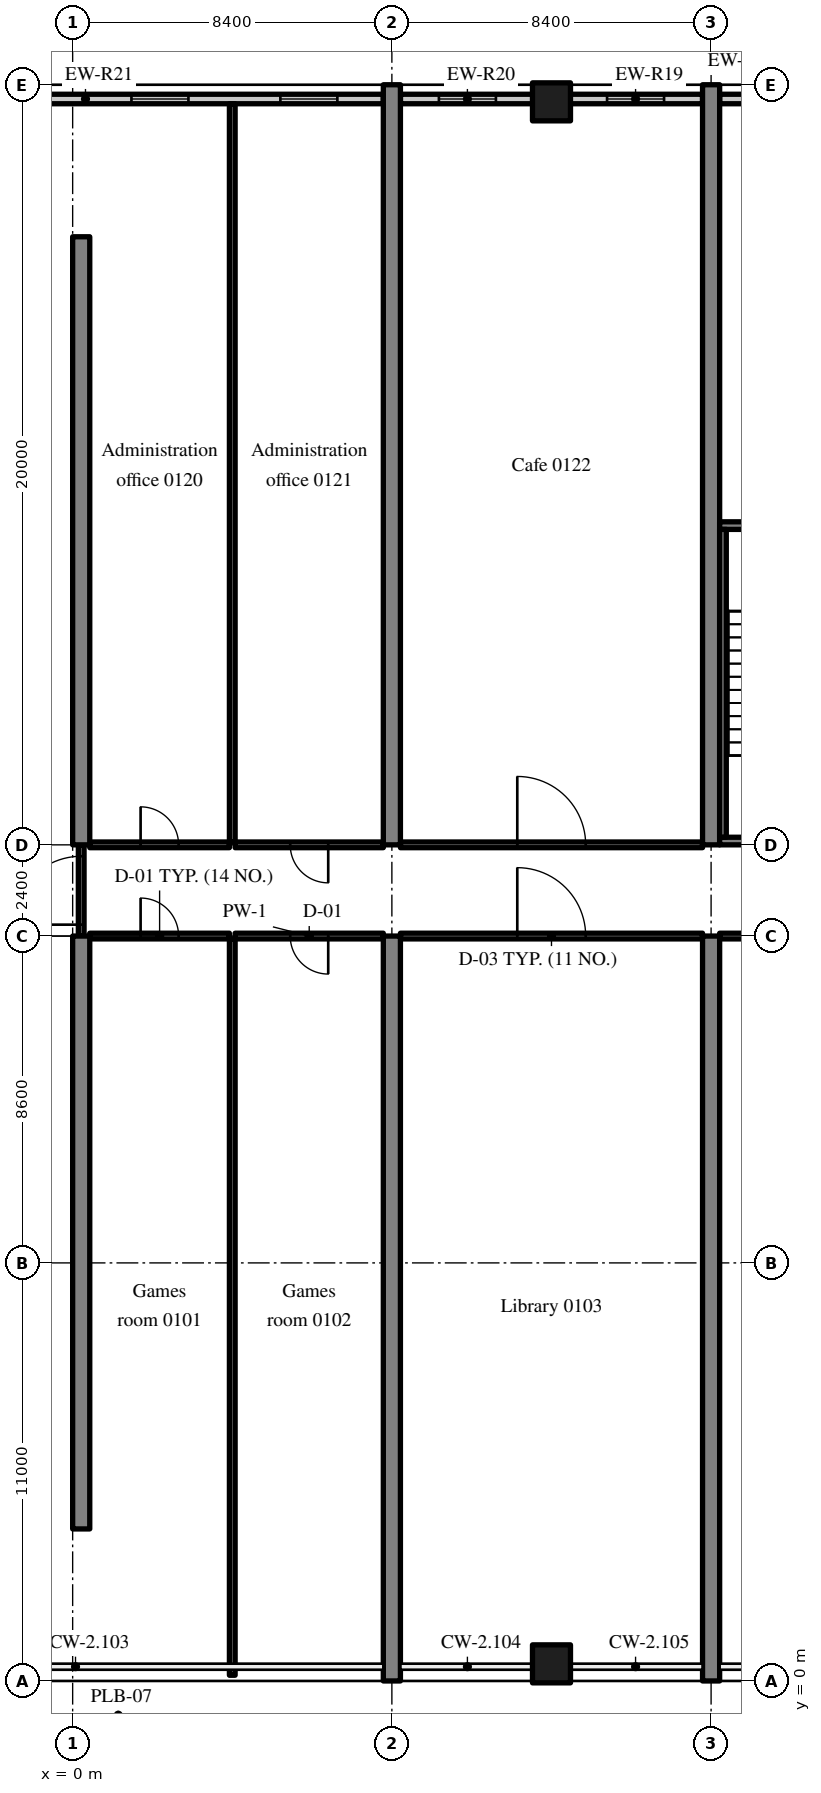
"""IFC4 building model, lengths in metres.
Left out: names, types, materials, properties, quantities, classifications, styles, units other than length and angle.
Written with IfcOpenShell. Run it as: python <this file> out.ifc"""

import sys

from ifc_helpers import new_model, si_unit, direction, frame, frame_2d, origin, origin_2d, place, context, subcontext, project, spatial, rectangle, extrude, source, transform, mapped, element, fill, save


model = new_model("IFC4")
c1 = context("Model", 3, precision=1e-05, world=origin(), true_north=direction((0.0, 1.0)))
c2 = subcontext(c1, "Body", "Model", "MODEL_VIEW")
j1 = project(units=[si_unit("LENGTHUNIT", "METRE"), si_unit("PLANEANGLEUNIT", "RADIAN")], contexts=[c1])
p1 = place(None, origin())
s1 = spatial("IfcSite", under=j1, at=p1, CompositionType="ELEMENT")
p2 = place(p1, origin())
s2 = spatial("IfcBuilding", under=s1, at=p2, CompositionType="ELEMENT")
p3 = place(p2, frame((0.0, 0.0, 6.0)))
s3 = spatial("IfcBuildingStorey", under=s2, at=p3, CompositionType="ELEMENT", Elevation=6.0)
m1 = source(origin(), c2, "Body", "SweptSolid", [
    extrude(rectangle(XDim=15.6, YDim=0.45, at=frame_2d((7.8, 0.0))), origin(), (0.0, 0.0, 1.0), 5.12),
])
p4 = place(p3, frame((0.225, 4.0, 0.0), z_axis=(0.0, 0.0, 1.0), x_axis=(0.0, 1.0, 0.0)))
e1 = element("IfcWall", 1, at=p4, inside=s3, PredefinedType="SHEAR", context=c2, shape_type="MappedRepresentation", body=[
    mapped(m1, transform((0.0, 0.0, 0.0), scale=1.0)),
])
m2 = source(origin(), c2, "Body", "SweptSolid", [
    extrude(rectangle(XDim=16.0, YDim=0.45, at=frame_2d((8.0, 0.0))), origin(), (0.0, 0.0, 1.0), 5.12),
])
p5 = place(p3, frame((0.225, 22.0, 0.0), z_axis=(0.0, 0.0, 1.0), x_axis=(0.0, 1.0, 0.0)))
e2 = element("IfcWall", 2, at=p5, inside=s3, PredefinedType="SHEAR", context=c2, shape_type="MappedRepresentation", body=[
    mapped(m2, transform((0.0, 0.0, 0.0), scale=1.0)),
])
m3 = source(origin(), c2, "Body", "SweptSolid", [
    extrude(rectangle(XDim=19.6, YDim=0.45, at=frame_2d((9.8, 0.0))), origin(), (0.0, 0.0, 1.0), 5.12),
])
p6 = place(p3, frame((8.4, 0.0, 0.0), z_axis=(0.0, 0.0, 1.0), x_axis=(0.0, 1.0, 0.0)))
e3 = element("IfcWall", 3, at=p6, inside=s3, PredefinedType="SHEAR", context=c2, shape_type="MappedRepresentation", body=[
    mapped(m3, transform((0.0, 0.0, 0.0), scale=1.0)),
])
m4 = source(origin(), c2, "Body", "SweptSolid", [
    extrude(rectangle(XDim=20.0, YDim=0.45, at=frame_2d((10.0, 0.0))), origin(), (0.0, 0.0, 1.0), 5.12),
])
p7 = place(p3, frame((8.4, 22.0, 0.0), z_axis=(0.0, 0.0, 1.0), x_axis=(0.0, 1.0, 0.0)))
e4 = element("IfcWall", 4, at=p7, inside=s3, PredefinedType="SHEAR", context=c2, shape_type="MappedRepresentation", body=[
    mapped(m4, transform((0.0, 0.0, 0.0), scale=1.0)),
])
p8 = place(p3, frame((16.8, 0.0, 0.0), z_axis=(0.0, 0.0, 1.0), x_axis=(0.0, 1.0, 0.0)))
e5 = element("IfcWall", 5, at=p8, inside=s3, PredefinedType="SHEAR", context=c2, shape_type="MappedRepresentation", body=[
    mapped(m3, transform((0.0, 0.0, 0.0), scale=1.0)),
])
p9 = place(p3, frame((16.8, 22.0, 0.0), z_axis=(0.0, 0.0, 1.0), x_axis=(0.0, 1.0, 0.0)))
e6 = element("IfcWall", 6, at=p9, inside=s3, PredefinedType="SHEAR", context=c2, shape_type="MappedRepresentation", body=[
    mapped(m4, transform((0.0, 0.0, 0.0), scale=1.0)),
])
m5 = source(origin(), c2, "Body", "SweptSolid", [
    extrude(rectangle(XDim=1.0, YDim=1.0, at=origin_2d()), origin(), (0.0, 0.0, 1.0), 5.12),
])
for number, where, z_axis, x_axis in (
    (7, (12.6, 0.45, 0.0), (0.0, 0.0, 1.0), (1.0, 0.0, 0.0)),
    (8, (12.6, 41.55, 0.0), (0.0, 0.0, 1.0), (1.0, 0.0, 0.0)),
):
    element("IfcColumn", number, at=place(p3, frame(where, z_axis=z_axis, x_axis=x_axis)), inside=s3, PredefinedType="COLUMN", context=c2, shape_type="MappedRepresentation", body=[
        mapped(m5, transform((0.0, 0.0, 0.0), scale=1.0)),
    ])
m6 = source(origin(), c2, "Body", "SweptSolid", [
    extrude(rectangle(XDim=1.513, YDim=0.25, at=frame_2d((0.756, 0.0))), origin(), (0.0, 0.0, 1.0), 4.37),
])
p10 = place(p3, frame((18.538, 41.625, 0.0), z_axis=(0.0, 0.0, 1.0), x_axis=(-1.0, 0.0, 0.0)))
e9 = element("IfcWall", 9, at=p10, inside=s3, PredefinedType="SOLIDWALL", context=c2, shape_type="MappedRepresentation", body=[
    mapped(m6, transform((0.0, 0.0, 0.0), scale=1.0)),
])
m7 = source(origin(), c2, "Body", "SweptSolid", [
    extrude(rectangle(XDim=3.525, YDim=0.25, at=frame_2d((1.762, 0.0))), origin(), (0.0, 0.0, 1.0), 4.37),
])
p11 = place(p3, frame((16.575, 41.625, 0.0), z_axis=(0.0, 0.0, 1.0), x_axis=(-1.0, 0.0, 0.0)))
e10 = element("IfcWall", 10, at=p11, inside=s3, PredefinedType="SOLIDWALL", context=c2, shape_type="MappedRepresentation", body=[
    mapped(m7, transform((0.0, 0.0, 0.0), scale=1.0)),
])
m8 = source(origin(), c2, "Body", "SweptSolid", [
    extrude(rectangle(XDim=1.5, YDim=1.5, at=frame_2d((0.75, 0.75))), frame((0.0, 0.135, 0.0), z_axis=(0.0, -1.0, 0.0), x_axis=(1.0, 0.0, 0.0)), (0.0, 0.0, 1.0), 0.27),
])
p12 = place(p11, frame((1.012, 0.0, 0.9)))
e11 = element("IfcOpeningElement", 11, at=p12, cuts=e10, PredefinedType="OPENING", context=c2, shape_type="MappedRepresentation", body=[
    mapped(m8, transform((0.0, 0.0, 0.0), scale=1.0)),
])
p13 = place(p3, frame((12.15, 41.625, 0.0), z_axis=(0.0, 0.0, 1.0), x_axis=(-1.0, 0.0, 0.0)))
e12 = element("IfcWall", 12, at=p13, inside=s3, PredefinedType="SOLIDWALL", context=c2, shape_type="MappedRepresentation", body=[
    mapped(m7, transform((0.0, 0.0, 0.0), scale=1.0)),
])
p14 = place(p13, frame((1.012, 0.0, 0.9)))
e13 = element("IfcOpeningElement", 13, at=p14, cuts=e12, PredefinedType="OPENING", context=c2, shape_type="MappedRepresentation", body=[
    mapped(m8, transform((0.0, 0.0, 0.0), scale=1.0)),
])
m9 = source(origin(), c2, "Body", "SweptSolid", [
    extrude(rectangle(XDim=15.675, YDim=0.25, at=frame_2d((7.837, 0.0))), origin(), (0.0, 0.0, 1.0), 4.37),
])
p15 = place(p3, frame((8.175, 41.625, 0.0), z_axis=(0.0, 0.0, 1.0), x_axis=(-1.0, 0.0, 0.0)))
e14 = element("IfcWall", 14, at=p15, inside=s3, PredefinedType="SOLIDWALL", context=c2, shape_type="MappedRepresentation", body=[
    mapped(m9, transform((0.0, 0.0, 0.0), scale=1.0)),
])
p16 = place(p15, frame((1.209, 0.0, 0.9)))
e15 = element("IfcOpeningElement", 15, at=p16, cuts=e14, PredefinedType="OPENING", context=c2, shape_type="MappedRepresentation", body=[
    mapped(m8, transform((0.0, 0.0, 0.0), scale=1.0)),
])
p17 = place(p15, frame((5.128, 0.0, 0.9)))
e16 = element("IfcOpeningElement", 16, at=p17, cuts=e14, PredefinedType="OPENING", context=c2, shape_type="MappedRepresentation", body=[
    mapped(m8, transform((0.0, 0.0, 0.0), scale=1.0)),
])
p18 = place(p15, frame((9.047, 0.0, 0.9)))
e17 = element("IfcOpeningElement", 17, at=p18, cuts=e14, PredefinedType="OPENING", context=c2, shape_type="MappedRepresentation", body=[
    mapped(m8, transform((0.0, 0.0, 0.0), scale=1.0)),
])
p19 = place(p15, frame((12.966, 0.0, 0.9)))
e18 = element("IfcOpeningElement", 18, at=p19, cuts=e14, PredefinedType="OPENING", context=c2, shape_type="MappedRepresentation", body=[
    mapped(m8, transform((0.0, 0.0, 0.0), scale=1.0)),
])
m10 = source(origin(), c2, "Body", "SweptSolid", [
    extrude(rectangle(XDim=8.175, YDim=0.2, at=frame_2d((4.087, 0.0))), origin(), (0.0, 0.0, 1.0), 5.12),
])
p20 = place(p3, frame((17.025, 22.1, 0.0), z_axis=(0.0, 0.0, 1.0), x_axis=(1.0, 0.0, 0.0)))
e19 = element("IfcWall", 19, at=p20, inside=s3, PredefinedType="SOLIDWALL", context=c2, shape_type="MappedRepresentation", body=[
    mapped(m10, transform((0.0, 0.0, 0.0), scale=1.0)),
])
m11 = source(origin(), c2, "Body", "SweptSolid", [
    extrude(rectangle(XDim=1.2, YDim=2.1, at=frame_2d((0.6, 1.05))), frame((0.0, 0.11, 0.0), z_axis=(0.0, -1.0, 0.0), x_axis=(1.0, 0.0, 0.0)), (0.0, 0.0, 1.0), 0.22),
])
p21 = place(p20, frame((5.975, 0.0, 0.0)))
e20 = element("IfcOpeningElement", 20, at=p21, cuts=e19, PredefinedType="OPENING", context=c2, shape_type="MappedRepresentation", body=[
    mapped(m11, transform((0.0, 0.0, 0.0), scale=1.0)),
])
p22 = place(p3, frame((17.025, 30.4, 0.0), z_axis=(0.0, 0.0, 1.0), x_axis=(1.0, 0.0, 0.0)))
e21 = element("IfcWall", 21, at=p22, inside=s3, PredefinedType="SOLIDWALL", context=c2, shape_type="MappedRepresentation", body=[
    mapped(m10, transform((0.0, 0.0, 0.0), scale=1.0)),
])
m12 = source(origin(), c2, "Body", "SweptSolid", [
    extrude(rectangle(XDim=1.0, YDim=2.1, at=frame_2d((0.5, 1.05))), frame((0.0, 0.11, 0.0), z_axis=(0.0, -1.0, 0.0), x_axis=(1.0, 0.0, 0.0)), (0.0, 0.0, 1.0), 0.22),
])
p23 = place(p22, frame((6.075, 0.0, 0.0)))
e22 = element("IfcOpeningElement", 22, at=p23, cuts=e21, PredefinedType="OPENING", context=c2, shape_type="MappedRepresentation", body=[
    mapped(m12, transform((0.0, 0.0, 0.0), scale=1.0)),
])
m13 = source(origin(), c2, "Body", "SweptSolid", [
    extrude(rectangle(XDim=8.1, YDim=0.175, at=frame_2d((4.05, 0.0))), origin(), (0.0, 0.0, 1.0), 5.12),
])
p24 = place(p3, frame((17.112, 22.2, 0.0), z_axis=(0.0, 0.0, 1.0), x_axis=(0.0, 1.0, 0.0)))
e23 = element("IfcWall", 23, at=p24, inside=s3, PredefinedType="SOLIDWALL", context=c2, shape_type="MappedRepresentation", body=[
    mapped(m13, transform((0.0, 0.0, 0.0), scale=1.0)),
])
m14 = source(origin(), c2, "Body", "SweptSolid", [
    extrude(rectangle(XDim=3.675, YDim=0.15, at=frame_2d((1.837, 0.0))), origin(), (0.0, 0.0, 1.0), 4.42),
])
p25 = place(p3, frame((0.45, 19.6, 0.0), z_axis=(0.0, 0.0, 1.0), x_axis=(1.0, 0.0, 0.0)))
e24 = element("IfcWall", 24, at=p25, inside=s3, PredefinedType="PARTITIONING", context=c2, shape_type="MappedRepresentation", body=[
    mapped(m14, transform((0.0, 0.0, 0.0), scale=1.0)),
])
m15 = source(origin(), c2, "Body", "SweptSolid", [
    extrude(rectangle(XDim=1.0, YDim=2.1, at=frame_2d((0.5, 1.05))), frame((0.0, 0.085, 0.0), z_axis=(0.0, -1.0, 0.0), x_axis=(1.0, 0.0, 0.0)), (0.0, 0.0, 1.0), 0.17),
])
p26 = place(p25, frame((1.338, 0.0, 0.0)))
e25 = element("IfcOpeningElement", 25, at=p26, cuts=e24, PredefinedType="OPENING", context=c2, shape_type="MappedRepresentation", body=[
    mapped(m15, transform((0.0, 0.0, 0.0), scale=1.0)),
])
m16 = source(origin(), c2, "Body", "SweptSolid", [
    extrude(rectangle(XDim=3.9, YDim=0.15, at=frame_2d((1.95, 0.0))), origin(), (0.0, 0.0, 1.0), 4.42),
])
p27 = place(p3, frame((4.275, 19.6, 0.0), z_axis=(0.0, 0.0, 1.0), x_axis=(1.0, 0.0, 0.0)))
e26 = element("IfcWall", 26, at=p27, inside=s3, PredefinedType="PARTITIONING", context=c2, shape_type="MappedRepresentation", body=[
    mapped(m16, transform((0.0, 0.0, 0.0), scale=1.0)),
])
p28 = place(p27, frame((1.45, 0.0, 0.0)))
e27 = element("IfcOpeningElement", 27, at=p28, cuts=e26, PredefinedType="OPENING", context=c2, shape_type="MappedRepresentation", body=[
    mapped(m15, transform((0.0, 0.0, 0.0), scale=1.0)),
])
m17 = source(origin(), c2, "Body", "SweptSolid", [
    extrude(rectangle(XDim=19.375, YDim=0.15, at=frame_2d((9.688, 0.0))), origin(), (0.0, 0.0, 1.0), 5.12),
])
p29 = place(p3, frame((4.2, 0.15, 0.0), z_axis=(0.0, 0.0, 1.0), x_axis=(0.0, 1.0, 0.0)))
e28 = element("IfcWall", 28, at=p29, inside=s3, PredefinedType="PARTITIONING", context=c2, shape_type="MappedRepresentation", body=[
    mapped(m17, transform((0.0, 0.0, 0.0), scale=1.0)),
])
m18 = source(origin(), c2, "Body", "SweptSolid", [
    extrude(rectangle(XDim=7.95, YDim=0.15, at=frame_2d((3.975, 0.0))), origin(), (0.0, 0.0, 1.0), 4.42),
])
p30 = place(p3, frame((8.625, 19.6, 0.0), z_axis=(0.0, 0.0, 1.0), x_axis=(1.0, 0.0, 0.0)))
e29 = element("IfcWall", 29, at=p30, inside=s3, PredefinedType="PARTITIONING", context=c2, shape_type="MappedRepresentation", body=[
    mapped(m18, transform((0.0, 0.0, 0.0), scale=1.0)),
])
m19 = source(origin(), c2, "Body", "SweptSolid", [
    extrude(rectangle(XDim=1.8, YDim=2.1, at=frame_2d((0.9, 1.05))), frame((0.0, 0.085, 0.0), z_axis=(0.0, -1.0, 0.0), x_axis=(1.0, 0.0, 0.0)), (0.0, 0.0, 1.0), 0.17),
])
p31 = place(p30, frame((3.075, 0.0, 0.0)))
e30 = element("IfcOpeningElement", 30, at=p31, cuts=e29, PredefinedType="OPENING", context=c2, shape_type="MappedRepresentation", body=[
    mapped(m19, transform((0.0, 0.0, 0.0), scale=1.0)),
])
m20 = source(origin(), c2, "Body", "SweptSolid", [
    extrude(rectangle(XDim=7.95, YDim=0.15, at=frame_2d((3.975, 0.0))), origin(), (0.0, 0.0, 1.0), 4.42),
])
p32 = place(p3, frame((17.025, 19.6, 0.0), z_axis=(0.0, 0.0, 1.0), x_axis=(1.0, 0.0, 0.0)))
e31 = element("IfcWall", 31, at=p32, inside=s3, PredefinedType="PARTITIONING", context=c2, shape_type="MappedRepresentation", body=[
    mapped(m20, transform((0.0, 0.0, 0.0), scale=1.0)),
])
p33 = place(p32, frame((3.075, 0.0, 0.0)))
e32 = element("IfcOpeningElement", 32, at=p33, cuts=e31, PredefinedType="OPENING", context=c2, shape_type="MappedRepresentation", body=[
    mapped(m19, transform((0.0, 0.0, 0.0), scale=1.0)),
])
m21 = source(origin(), c2, "Body", "SweptSolid", [
    extrude(rectangle(XDim=2.4, YDim=0.15, at=frame_2d((1.2, 0.0))), origin(), (0.0, 0.0, 1.0), 4.22),
])
p34 = place(p3, frame((0.225, 19.6, 0.0), z_axis=(0.0, 0.0, 1.0), x_axis=(0.0, 1.0, 0.0)))
e33 = element("IfcWall", 33, at=p34, inside=s3, PredefinedType="PARTITIONING", context=c2, shape_type="MappedRepresentation", body=[
    mapped(m21, transform((0.0, 0.0, 0.0), scale=1.0)),
])
p35 = place(p34, frame((0.3, 0.0, 0.0)))
e34 = element("IfcOpeningElement", 34, at=p35, cuts=e33, PredefinedType="OPENING", context=c2, shape_type="MappedRepresentation", body=[
    mapped(m19, transform((0.0, 0.0, 0.0), scale=1.0)),
])
p36 = place(p3, frame((0.45, 22.0, 0.0), z_axis=(0.0, 0.0, 1.0), x_axis=(1.0, 0.0, 0.0)))
e35 = element("IfcWall", 35, at=p36, inside=s3, PredefinedType="PARTITIONING", context=c2, shape_type="MappedRepresentation", body=[
    mapped(m14, transform((0.0, 0.0, 0.0), scale=1.0)),
])
p37 = place(p36, frame((1.338, 0.0, 0.0)))
e36 = element("IfcOpeningElement", 36, at=p37, cuts=e35, PredefinedType="OPENING", context=c2, shape_type="MappedRepresentation", body=[
    mapped(m15, transform((0.0, 0.0, 0.0), scale=1.0)),
])
p38 = place(p3, frame((4.275, 22.0, 0.0), z_axis=(0.0, 0.0, 1.0), x_axis=(1.0, 0.0, 0.0)))
e37 = element("IfcWall", 37, at=p38, inside=s3, PredefinedType="PARTITIONING", context=c2, shape_type="MappedRepresentation", body=[
    mapped(m16, transform((0.0, 0.0, 0.0), scale=1.0)),
])
p39 = place(p38, frame((1.45, 0.0, 0.0)))
e38 = element("IfcOpeningElement", 38, at=p39, cuts=e37, PredefinedType="OPENING", context=c2, shape_type="MappedRepresentation", body=[
    mapped(m15, transform((0.0, 0.0, 0.0), scale=1.0)),
])
m22 = source(origin(), c2, "Body", "SweptSolid", [
    extrude(rectangle(XDim=19.425, YDim=0.15, at=frame_2d((9.712, 0.0))), origin(), (0.0, 0.0, 1.0), 5.12),
])
p40 = place(p3, frame((4.2, 22.075, 0.0), z_axis=(0.0, 0.0, 1.0), x_axis=(0.0, 1.0, 0.0)))
e39 = element("IfcWall", 39, at=p40, inside=s3, PredefinedType="PARTITIONING", context=c2, shape_type="MappedRepresentation", body=[
    mapped(m22, transform((0.0, 0.0, 0.0), scale=1.0)),
])
p41 = place(p3, frame((8.625, 22.0, 0.0), z_axis=(0.0, 0.0, 1.0), x_axis=(1.0, 0.0, 0.0)))
e40 = element("IfcWall", 40, at=p41, inside=s3, PredefinedType="PARTITIONING", context=c2, shape_type="MappedRepresentation", body=[
    mapped(m18, transform((0.0, 0.0, 0.0), scale=1.0)),
])
p42 = place(p41, frame((3.075, 0.0, 0.0)))
e41 = element("IfcOpeningElement", 41, at=p42, cuts=e40, PredefinedType="OPENING", context=c2, shape_type="MappedRepresentation", body=[
    mapped(m19, transform((0.0, 0.0, 0.0), scale=1.0)),
])
m23 = source(origin(), c2, "Body", "SweptSolid", [
    extrude(rectangle(XDim=1.5, YDim=1.5, at=frame_2d((0.75, 0.75))), frame((0.0, 0.03, 0.0), z_axis=(0.0, -1.0, 0.0), x_axis=(1.0, 0.0, 0.0)), (0.0, 0.0, 1.0), 0.06),
])
p43 = place(p12, origin())
e42 = element("IfcWindow", 42, at=p43, inside=s3, PartitioningType="SINGLE_PANEL", PredefinedType="WINDOW", context=c2, shape_type="MappedRepresentation", body=[
    mapped(m23, transform((0.0, 0.0, 0.0), scale=1.0)),
])
fill(e11, e42)
p44 = place(p14, origin())
e43 = element("IfcWindow", 43, at=p44, inside=s3, PartitioningType="SINGLE_PANEL", PredefinedType="WINDOW", context=c2, shape_type="MappedRepresentation", body=[
    mapped(m23, transform((0.0, 0.0, 0.0), scale=1.0)),
])
fill(e13, e43)
p45 = place(p16, origin())
e44 = element("IfcWindow", 44, at=p45, inside=s3, PartitioningType="SINGLE_PANEL", PredefinedType="WINDOW", context=c2, shape_type="MappedRepresentation", body=[
    mapped(m23, transform((0.0, 0.0, 0.0), scale=1.0)),
])
fill(e15, e44)
p46 = place(p17, origin())
e45 = element("IfcWindow", 45, at=p46, inside=s3, PartitioningType="SINGLE_PANEL", PredefinedType="WINDOW", context=c2, shape_type="MappedRepresentation", body=[
    mapped(m23, transform((0.0, 0.0, 0.0), scale=1.0)),
])
fill(e16, e45)
m24 = source(origin(), c2, "Body", "SweptSolid", [
    extrude(rectangle(XDim=1.0, YDim=2.1, at=frame_2d((0.5, 1.05))), frame((0.0, 0.025, 0.0), z_axis=(0.0, -1.0, 0.0), x_axis=(1.0, 0.0, 0.0)), (0.0, 0.0, 1.0), 0.05),
])
p47 = place(p26, origin())
e46 = element("IfcDoor", 46, at=p47, inside=s3, OperationType="SINGLE_SWING_LEFT", PredefinedType="DOOR", context=c2, shape_type="MappedRepresentation", body=[
    mapped(m24, transform((0.0, 0.0, 0.0), scale=1.0)),
])
fill(e25, e46)
p48 = place(p28, origin())
e47 = element("IfcDoor", 47, at=p48, inside=s3, OperationType="SINGLE_SWING_RIGHT", PredefinedType="DOOR", context=c2, shape_type="MappedRepresentation", body=[
    mapped(m24, transform((0.0, 0.0, 0.0), scale=1.0)),
])
fill(e27, e47)
m25 = source(origin(), c2, "Body", "SweptSolid", [
    extrude(rectangle(XDim=1.8, YDim=2.1, at=frame_2d((0.9, 1.05))), frame((0.0, 0.025, 0.0), z_axis=(0.0, -1.0, 0.0), x_axis=(1.0, 0.0, 0.0)), (0.0, 0.0, 1.0), 0.05),
])
p49 = place(p31, origin())
e48 = element("IfcDoor", 48, at=p49, inside=s3, OperationType="DOUBLE_DOOR_SINGLE_SWING", PredefinedType="DOOR", context=c2, shape_type="MappedRepresentation", body=[
    mapped(m25, transform((0.0, 0.0, 0.0), scale=1.0)),
])
fill(e30, e48)
p50 = place(p35, origin())
e49 = element("IfcDoor", 49, at=p50, inside=s3, OperationType="DOUBLE_DOOR_SINGLE_SWING", PredefinedType="DOOR", context=c2, shape_type="MappedRepresentation", body=[
    mapped(m25, transform((0.0, 0.0, 0.0), scale=1.0)),
])
fill(e34, e49)
p51 = place(p37, origin())
e50 = element("IfcDoor", 50, at=p51, inside=s3, OperationType="SINGLE_SWING_LEFT", PredefinedType="DOOR", context=c2, shape_type="MappedRepresentation", body=[
    mapped(m24, transform((0.0, 0.0, 0.0), scale=1.0)),
])
fill(e36, e50)
p52 = place(p39, origin())
e51 = element("IfcDoor", 51, at=p52, inside=s3, OperationType="SINGLE_SWING_RIGHT", PredefinedType="DOOR", context=c2, shape_type="MappedRepresentation", body=[
    mapped(m24, transform((0.0, 0.0, 0.0), scale=1.0)),
])
fill(e38, e51)
p53 = place(p42, origin())
e52 = element("IfcDoor", 52, at=p53, inside=s3, OperationType="DOUBLE_DOOR_SINGLE_SWING", PredefinedType="DOOR", context=c2, shape_type="MappedRepresentation", body=[
    mapped(m25, transform((0.0, 0.0, 0.0), scale=1.0)),
])
fill(e41, e52)
save(model, sys.argv[1])
